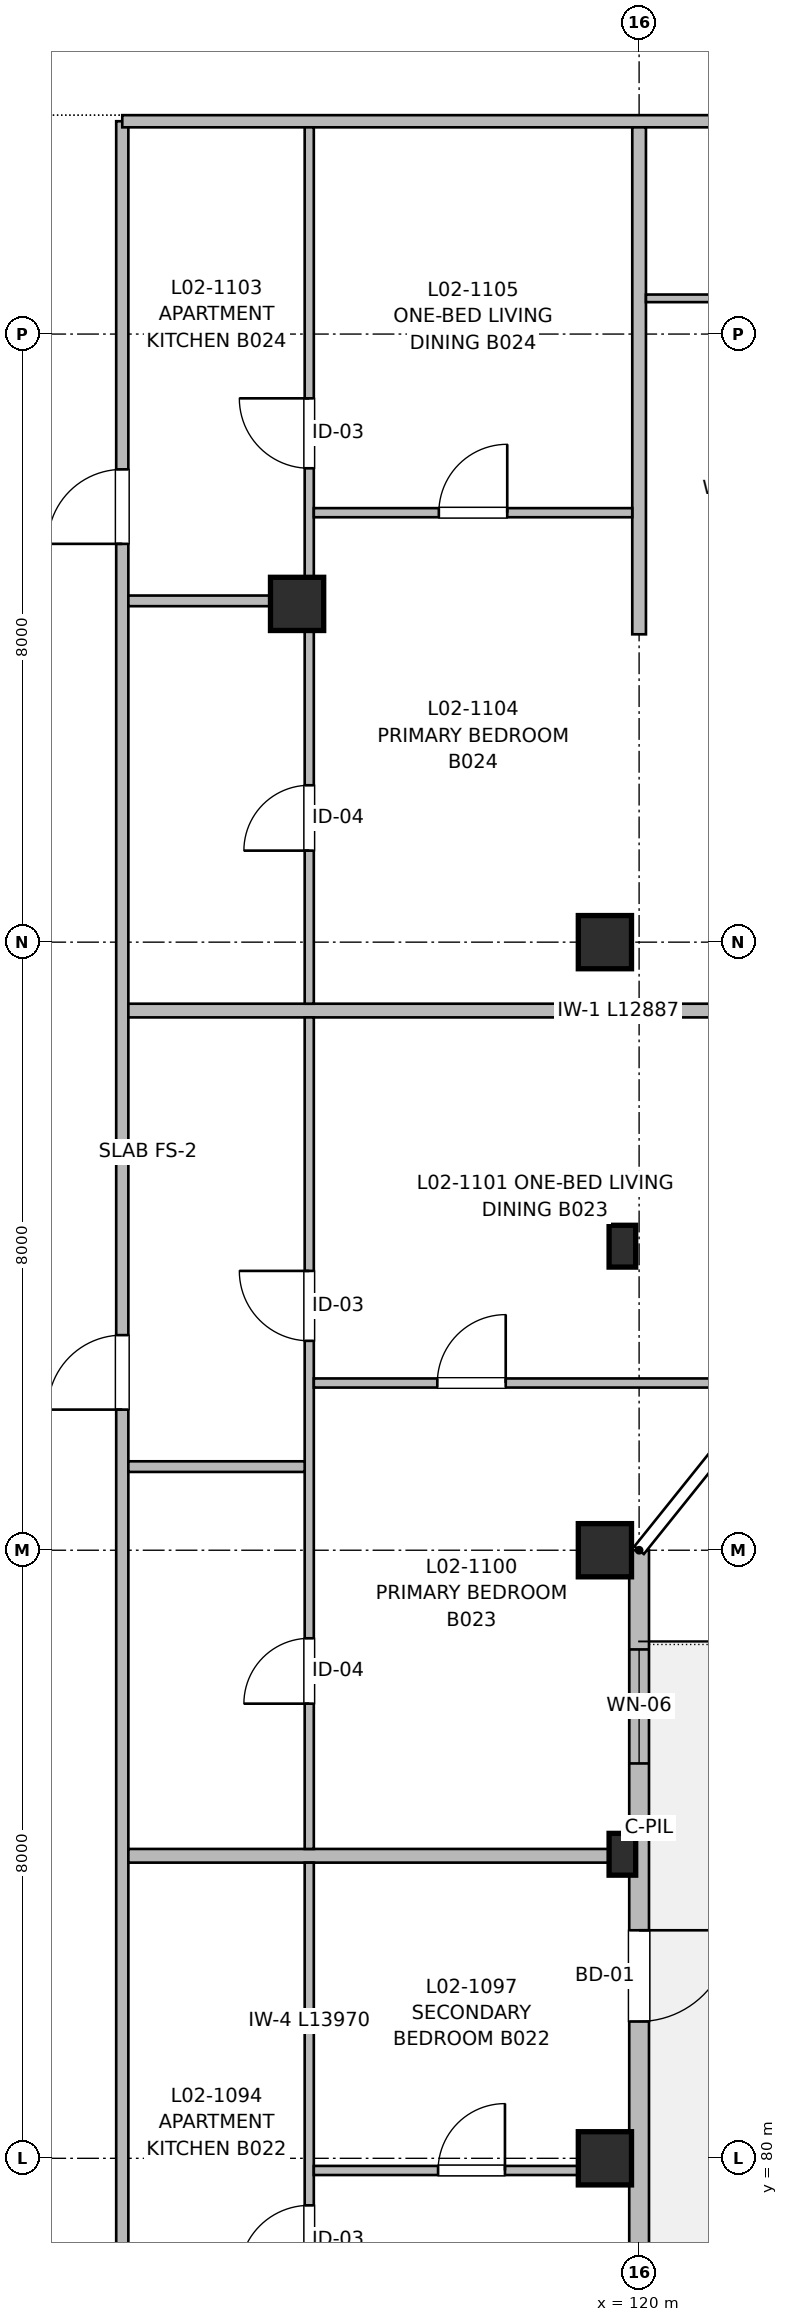
"""IFC4 building model, lengths in metres.
Left out: names, types, materials, properties, quantities, classifications, styles, units other than length and angle.
Written with IfcOpenShell. Run it as: python <this file> out.ifc"""

import sys

from ifc_helpers import new_model, si_unit, direction, frame, frame_2d, origin, origin_2d, place, context, subcontext, project, spatial, rectangle, extrude, element, fill, save


model = new_model("IFC4")
c1 = context("Model", 3, precision=1e-05, world=origin(), true_north=direction((0.0, 1.0)))
c2 = subcontext(c1, "Body", "Model", "MODEL_VIEW")
j1 = project(units=[si_unit("LENGTHUNIT", "METRE"), si_unit("PLANEANGLEUNIT", "RADIAN")], contexts=[c1])
p1 = place(None, origin())
s1 = spatial("IfcSite", under=j1, at=p1, CompositionType="ELEMENT")
p2 = place(p1, origin())
s2 = spatial("IfcBuilding", under=s1, at=p2, CompositionType="ELEMENT")
p3 = place(p2, frame((0.0, 0.0, 7.36)))
s3 = spatial("IfcBuildingStorey", under=s2, at=p3, CompositionType="ELEMENT", Elevation=7.36)
for number, where, z_axis, x_axis in (
    (1, (115.5, 100.45, 0.0), (0.0, 0.0, 1.0), (1.0, 0.0, 0.0)),
    (2, (119.55, 80.0, 0.0), (0.0, 0.0, 1.0), (1.0, 0.0, 0.0)),
    (3, (119.55, 88.0, 0.0), (0.0, 0.0, 1.0), (1.0, 0.0, 0.0)),
    (4, (119.55, 96.0, 0.0), (0.0, 0.0, 1.0), (1.0, 0.0, 0.0)),
):
    element("IfcColumn", number, at=place(p3, frame(where, z_axis=z_axis, x_axis=x_axis)), inside=s3, PredefinedType="COLUMN", context=c2, shape_type="SweptSolid", body=[
        extrude(rectangle(XDim=0.7, YDim=0.7, at=origin_2d()), origin(), (0.0, 0.0, 1.0), 3.2),
    ])
for number, where, z_axis, x_axis in (
    (5, (119.78, 84.0, 0.0), (0.0, 0.0, 1.0), (1.0, 0.0, 0.0)),
    (6, (119.78, 92.0, 0.0), (0.0, 0.0, 1.0), (1.0, 0.0, 0.0)),
):
    element("IfcColumn", number, at=place(p3, frame(where, z_axis=z_axis, x_axis=x_axis)), inside=s3, PredefinedType="PILASTER", context=c2, shape_type="SweptSolid", body=[
        extrude(rectangle(XDim=0.35, YDim=0.55, at=origin_2d()), origin(), (0.0, 0.0, 1.0), 3.2),
    ])
p4 = place(p3, frame((120.0, 88.0, 0.0), z_axis=(0.0, 0.0, 1.0), x_axis=(0.0, -1.0, 0.0)))
e7 = element("IfcWall", 7, at=p4, inside=s3, PredefinedType="SOLIDWALL", context=c2, shape_type="SweptSolid", body=[
    extrude(rectangle(XDim=32.0, YDim=0.26, at=frame_2d((16.0, 0.0))), origin(), (0.0, 0.0, 1.0), 2.98),
])
p5 = place(p4, frame((5.0, 0.0, 0.0)))
e8 = element("IfcOpeningElement", 8, at=p5, cuts=e7, PredefinedType="OPENING", context=c2, shape_type="SweptSolid", body=[
    extrude(rectangle(XDim=1.2, YDim=2.2, at=frame_2d((0.6, 1.1))), frame((0.0, 0.14, 0.0), z_axis=(0.0, -1.0, 0.0), x_axis=(1.0, 0.0, 0.0)), (0.0, 0.0, 1.0), 0.28),
])
p6 = place(p4, frame((11.45, 0.0, 0.62)))
e9 = element("IfcOpeningElement", 9, at=p6, cuts=e7, PredefinedType="OPENING", context=c2, shape_type="SweptSolid", body=[
    extrude(rectangle(XDim=1.1, YDim=1.6, at=frame_2d((0.55, 0.8))), frame((0.0, 0.14, 0.0), z_axis=(0.0, -1.0, 0.0), x_axis=(1.0, 0.0, 0.0)), (0.0, 0.0, 1.0), 0.28),
])
p7 = place(p4, frame((18.65, 0.0, 0.47)))
e10 = element("IfcOpeningElement", 10, at=p7, cuts=e7, PredefinedType="OPENING", context=c2, shape_type="SweptSolid", body=[
    extrude(rectangle(XDim=2.7, YDim=1.75, at=frame_2d((1.35, 0.875))), frame((0.0, 0.14, 0.0), z_axis=(0.0, -1.0, 0.0), x_axis=(1.0, 0.0, 0.0)), (0.0, 0.0, 1.0), 0.28),
])
p8 = place(p4, frame((28.45, 0.0, 0.72)))
e11 = element("IfcOpeningElement", 11, at=p8, cuts=e7, PredefinedType="OPENING", context=c2, shape_type="SweptSolid", body=[
    extrude(rectangle(XDim=1.7, YDim=1.5, at=frame_2d((0.85, 0.75))), frame((0.0, 0.14, 0.0), z_axis=(0.0, -1.0, 0.0), x_axis=(1.0, 0.0, 0.0)), (0.0, 0.0, 1.0), 0.28),
])
p9 = place(p4, frame((24.519, 0.0, 0.82)))
e12 = element("IfcOpeningElement", 12, at=p9, cuts=e7, PredefinedType="OPENING", context=c2, shape_type="SweptSolid", body=[
    extrude(rectangle(XDim=1.5, YDim=1.4, at=frame_2d((0.75, 0.7))), frame((0.0, 0.14, 0.0), z_axis=(0.0, -1.0, 0.0), x_axis=(1.0, 0.0, 0.0)), (0.0, 0.0, 1.0), 0.28),
])
p10 = place(p4, frame((14.021, 0.0, 0.82)))
e13 = element("IfcOpeningElement", 13, at=p10, cuts=e7, PredefinedType="OPENING", context=c2, shape_type="SweptSolid", body=[
    extrude(rectangle(XDim=1.5, YDim=1.4, at=frame_2d((0.75, 0.7))), frame((0.0, 0.14, 0.0), z_axis=(0.0, -1.0, 0.0), x_axis=(1.0, 0.0, 0.0)), (0.0, 0.0, 1.0), 0.28),
])
p11 = place(p4, frame((1.305, 0.0, 0.82)))
e14 = element("IfcOpeningElement", 14, at=p11, cuts=e7, PredefinedType="OPENING", context=c2, shape_type="SweptSolid", body=[
    extrude(rectangle(XDim=1.5, YDim=1.4, at=frame_2d((0.75, 0.7))), frame((0.0, 0.14, 0.0), z_axis=(0.0, -1.0, 0.0), x_axis=(1.0, 0.0, 0.0)), (0.0, 0.0, 1.0), 0.28),
])
p12 = place(p3, frame((113.2, 56.18, 0.0), z_axis=(0.0, 0.0, 1.0), x_axis=(0.0, 1.0, 0.0)))
e15 = element("IfcWall", 15, at=p12, inside=s3, PredefinedType="PARTITIONING", context=c2, shape_type="SweptSolid", body=[
    extrude(rectangle(XDim=50.62, YDim=0.16, at=frame_2d((25.31, 0.0))), origin(), (0.0, 0.0, 1.0), 2.935),
])
p13 = place(p12, frame((6.99, 0.0, 0.0)))
e16 = element("IfcOpeningElement", 16, at=p13, cuts=e15, PredefinedType="OPENING", context=c2, shape_type="SweptSolid", body=[
    extrude(rectangle(XDim=0.98, YDim=2.15, at=frame_2d((0.49, 1.075))), frame((0.0, 0.09, 0.0), z_axis=(0.0, -1.0, 0.0), x_axis=(1.0, 0.0, 0.0)), (0.0, 0.0, 1.0), 0.18),
])
p14 = place(p12, frame((20.92, 0.0, 0.0)))
e17 = element("IfcOpeningElement", 17, at=p14, cuts=e15, PredefinedType="OPENING", context=c2, shape_type="SweptSolid", body=[
    extrude(rectangle(XDim=0.98, YDim=2.15, at=frame_2d((0.49, 1.075))), frame((0.0, 0.09, 0.0), z_axis=(0.0, -1.0, 0.0), x_axis=(1.0, 0.0, 0.0)), (0.0, 0.0, 1.0), 0.18),
])
p15 = place(p12, frame((33.67, 0.0, 0.0)))
e18 = element("IfcOpeningElement", 18, at=p15, cuts=e15, PredefinedType="OPENING", context=c2, shape_type="SweptSolid", body=[
    extrude(rectangle(XDim=0.98, YDim=2.15, at=frame_2d((0.49, 1.075))), frame((0.0, 0.09, 0.0), z_axis=(0.0, -1.0, 0.0), x_axis=(1.0, 0.0, 0.0)), (0.0, 0.0, 1.0), 0.18),
])
p16 = place(p12, frame((45.06, 0.0, 0.0)))
e19 = element("IfcOpeningElement", 19, at=p16, cuts=e15, PredefinedType="OPENING", context=c2, shape_type="SweptSolid", body=[
    extrude(rectangle(XDim=0.98, YDim=2.15, at=frame_2d((0.49, 1.075))), frame((0.0, 0.09, 0.0), z_axis=(0.0, -1.0, 0.0), x_axis=(1.0, 0.0, 0.0)), (0.0, 0.0, 1.0), 0.18),
])
p17 = place(p3, frame((113.2, 106.8, 0.0), z_axis=(0.0, 0.0, 1.0), x_axis=(1.0, 0.0, 0.0)))
e20 = element("IfcWall", 20, at=p17, inside=s3, PredefinedType="PARTITIONING", context=c2, shape_type="SweptSolid", body=[
    extrude(rectangle(XDim=24.12, YDim=0.16, at=frame_2d((12.06, 0.0))), origin(), (0.0, 0.0, 1.0), 2.935),
])
p18 = place(p17, frame((19.575, 0.0, 0.0)))
e21 = element("IfcOpeningElement", 21, at=p18, cuts=e20, PredefinedType="OPENING", context=c2, shape_type="SweptSolid", body=[
    extrude(rectangle(XDim=1.05, YDim=2.15, at=frame_2d((0.525, 1.075))), frame((0.0, 0.09, 0.0), z_axis=(0.0, -1.0, 0.0), x_axis=(1.0, 0.0, 0.0)), (0.0, 0.0, 1.0), 0.18),
])
p19 = place(p17, frame((8.995, 0.0, 0.0)))
e22 = element("IfcOpeningElement", 22, at=p19, cuts=e20, PredefinedType="OPENING", context=c2, shape_type="SweptSolid", body=[
    extrude(rectangle(XDim=0.98, YDim=2.15, at=frame_2d((0.49, 1.075))), frame((0.0, 0.09, 0.0), z_axis=(0.0, -1.0, 0.0), x_axis=(1.0, 0.0, 0.0)), (0.0, 0.0, 1.0), 0.18),
])
p20 = place(p3, frame((120.0, 100.05, 0.0), z_axis=(0.0, 0.0, 1.0), x_axis=(0.0, 1.0, 0.0)))
e23 = element("IfcWall", 23, at=p20, inside=s3, PredefinedType="PARTITIONING", context=c2, shape_type="SweptSolid", body=[
    extrude(rectangle(XDim=6.67, YDim=0.18, at=frame_2d((3.335, 0.0))), origin(), (0.0, 0.0, 1.0), 2.935),
])
p21 = place(p3, frame((113.28, 83.98, 0.0), z_axis=(0.0, 0.0, 1.0), x_axis=(1.0, 0.0, 0.0)))
e24 = element("IfcWall", 24, at=p21, inside=s3, PredefinedType="PARTITIONING", context=c2, shape_type="SweptSolid", body=[
    extrude(rectangle(XDim=6.59, YDim=0.18, at=frame_2d((3.295, 0.0))), origin(), (0.0, 0.0, 1.0), 2.935),
])
p22 = place(p3, frame((113.28, 95.1, 0.0), z_axis=(0.0, 0.0, 1.0), x_axis=(1.0, 0.0, 0.0)))
e25 = element("IfcWall", 25, at=p22, inside=s3, PredefinedType="PARTITIONING", context=c2, shape_type="SweptSolid", body=[
    extrude(rectangle(XDim=12.887, YDim=0.18, at=frame_2d((6.444, 0.0))), origin(), (0.0, 0.0, 1.0), 2.935),
])
p23 = place(p3, frame((115.66, 69.92, 0.0), z_axis=(0.0, 0.0, 1.0), x_axis=(0.0, 1.0, 0.0)))
e26 = element("IfcWall", 26, at=p23, inside=s3, PredefinedType="PARTITIONING", context=c2, shape_type="SweptSolid", body=[
    extrude(rectangle(XDim=13.97, YDim=0.12, at=frame_2d((6.985, 0.0))), origin(), (0.0, 0.0, 1.0), 2.935),
])
p24 = place(p23, frame((2.443, 0.0, 0.0)))
e27 = element("IfcOpeningElement", 27, at=p24, cuts=e26, PredefinedType="OPENING", context=c2, shape_type="SweptSolid", body=[
    extrude(rectangle(XDim=0.86, YDim=2.1, at=frame_2d((0.43, 1.05))), frame((0.0, 0.07, 0.0), z_axis=(0.0, -1.0, 0.0), x_axis=(1.0, 0.0, 0.0)), (0.0, 0.0, 1.0), 0.14),
])
p25 = place(p23, frame((8.541, 0.0, 0.0)))
e28 = element("IfcOpeningElement", 28, at=p25, cuts=e26, PredefinedType="OPENING", context=c2, shape_type="SweptSolid", body=[
    extrude(rectangle(XDim=0.92, YDim=2.1, at=frame_2d((0.46, 1.05))), frame((0.0, 0.07, 0.0), z_axis=(0.0, -1.0, 0.0), x_axis=(1.0, 0.0, 0.0)), (0.0, 0.0, 1.0), 0.14),
])
p26 = place(p3, frame((115.72, 79.84, 0.0), z_axis=(0.0, 0.0, 1.0), x_axis=(1.0, 0.0, 0.0)))
e29 = element("IfcWall", 29, at=p26, inside=s3, PredefinedType="PARTITIONING", context=c2, shape_type="SweptSolid", body=[
    extrude(rectangle(XDim=4.15, YDim=0.12, at=frame_2d((2.075, 0.0))), origin(), (0.0, 0.0, 1.0), 2.53),
])
p27 = place(p26, frame((1.635, 0.0, 0.0)))
e30 = element("IfcOpeningElement", 30, at=p27, cuts=e29, PredefinedType="OPENING", context=c2, shape_type="SweptSolid", body=[
    extrude(rectangle(XDim=0.88, YDim=2.1, at=frame_2d((0.44, 1.05))), frame((0.0, 0.07, 0.0), z_axis=(0.0, -1.0, 0.0), x_axis=(1.0, 0.0, 0.0)), (0.0, 0.0, 1.0), 0.14),
])
p28 = place(p3, frame((115.66, 84.07, 0.0), z_axis=(0.0, 0.0, 1.0), x_axis=(0.0, 1.0, 0.0)))
e31 = element("IfcWall", 31, at=p28, inside=s3, PredefinedType="PARTITIONING", context=c2, shape_type="SweptSolid", body=[
    extrude(rectangle(XDim=10.94, YDim=0.12, at=frame_2d((5.47, 0.0))), origin(), (0.0, 0.0, 1.0), 2.935),
])
p29 = place(p28, frame((1.911, 0.0, 0.0)))
e32 = element("IfcOpeningElement", 32, at=p29, cuts=e31, PredefinedType="OPENING", context=c2, shape_type="SweptSolid", body=[
    extrude(rectangle(XDim=0.86, YDim=2.1, at=frame_2d((0.43, 1.05))), frame((0.0, 0.07, 0.0), z_axis=(0.0, -1.0, 0.0), x_axis=(1.0, 0.0, 0.0)), (0.0, 0.0, 1.0), 0.14),
])
p30 = place(p28, frame((6.685, 0.0, 0.0)))
e33 = element("IfcOpeningElement", 33, at=p30, cuts=e31, PredefinedType="OPENING", context=c2, shape_type="SweptSolid", body=[
    extrude(rectangle(XDim=0.92, YDim=2.1, at=frame_2d((0.46, 1.05))), frame((0.0, 0.07, 0.0), z_axis=(0.0, -1.0, 0.0), x_axis=(1.0, 0.0, 0.0)), (0.0, 0.0, 1.0), 0.14),
])
p31 = place(p3, frame((113.28, 89.1, 0.0), z_axis=(0.0, 0.0, 1.0), x_axis=(1.0, 0.0, 0.0)))
e34 = element("IfcWall", 34, at=p31, inside=s3, PredefinedType="PARTITIONING", context=c2, shape_type="SweptSolid", body=[
    extrude(rectangle(XDim=2.32, YDim=0.14, at=frame_2d((1.16, 0.0))), origin(), (0.0, 0.0, 1.0), 2.935),
])
p32 = place(p3, frame((115.72, 90.2, 0.0), z_axis=(0.0, 0.0, 1.0), x_axis=(1.0, 0.0, 0.0)))
e35 = element("IfcWall", 35, at=p32, inside=s3, PredefinedType="PARTITIONING", context=c2, shape_type="SweptSolid", body=[
    extrude(rectangle(XDim=5.994, YDim=0.12, at=frame_2d((2.997, 0.0))), origin(), (0.0, 0.0, 1.0), 2.935),
])
p33 = place(p32, frame((1.625, 0.0, 0.0)))
e36 = element("IfcOpeningElement", 36, at=p33, cuts=e35, PredefinedType="OPENING", context=c2, shape_type="SweptSolid", body=[
    extrude(rectangle(XDim=0.9, YDim=2.1, at=frame_2d((0.45, 1.05))), frame((0.0, 0.07, 0.0), z_axis=(0.0, -1.0, 0.0), x_axis=(1.0, 0.0, 0.0)), (0.0, 0.0, 1.0), 0.14),
])
p34 = place(p3, frame((115.66, 95.19, 0.0), z_axis=(0.0, 0.0, 1.0), x_axis=(0.0, 1.0, 0.0)))
e37 = element("IfcWall", 37, at=p34, inside=s3, PredefinedType="PARTITIONING", context=c2, shape_type="SweptSolid", body=[
    extrude(rectangle(XDim=11.53, YDim=0.12, at=frame_2d((5.765, 0.0))), origin(), (0.0, 0.0, 1.0), 2.68),
])
p35 = place(p34, frame((2.014, 0.0, 0.0)))
e38 = element("IfcOpeningElement", 38, at=p35, cuts=e37, PredefinedType="OPENING", context=c2, shape_type="SweptSolid", body=[
    extrude(rectangle(XDim=0.86, YDim=2.1, at=frame_2d((0.43, 1.05))), frame((0.0, 0.07, 0.0), z_axis=(0.0, -1.0, 0.0), x_axis=(1.0, 0.0, 0.0)), (0.0, 0.0, 1.0), 0.14),
])
p36 = place(p34, frame((7.044, 0.0, 0.0)))
e39 = element("IfcOpeningElement", 39, at=p36, cuts=e37, PredefinedType="OPENING", context=c2, shape_type="SweptSolid", body=[
    extrude(rectangle(XDim=0.92, YDim=2.1, at=frame_2d((0.46, 1.05))), frame((0.0, 0.07, 0.0), z_axis=(0.0, -1.0, 0.0), x_axis=(1.0, 0.0, 0.0)), (0.0, 0.0, 1.0), 0.14),
])
p37 = place(p3, frame((113.28, 100.49, 0.0), z_axis=(0.0, 0.0, 1.0), x_axis=(1.0, 0.0, 0.0)))
e40 = element("IfcWall", 40, at=p37, inside=s3, PredefinedType="PARTITIONING", context=c2, shape_type="SweptSolid", body=[
    extrude(rectangle(XDim=2.32, YDim=0.14, at=frame_2d((1.16, 0.0))), origin(), (0.0, 0.0, 1.0), 2.73),
])
p38 = place(p3, frame((115.72, 101.65, 0.0), z_axis=(0.0, 0.0, 1.0), x_axis=(1.0, 0.0, 0.0)))
e41 = element("IfcWall", 41, at=p38, inside=s3, PredefinedType="PARTITIONING", context=c2, shape_type="SweptSolid", body=[
    extrude(rectangle(XDim=4.19, YDim=0.12, at=frame_2d((2.095, 0.0))), origin(), (0.0, 0.0, 1.0), 2.935),
])
p39 = place(p38, frame((1.645, 0.0, 0.0)))
e42 = element("IfcOpeningElement", 42, at=p39, cuts=e41, PredefinedType="OPENING", context=c2, shape_type="SweptSolid", body=[
    extrude(rectangle(XDim=0.9, YDim=2.1, at=frame_2d((0.45, 1.05))), frame((0.0, 0.07, 0.0), z_axis=(0.0, -1.0, 0.0), x_axis=(1.0, 0.0, 0.0)), (0.0, 0.0, 1.0), 0.14),
])
p40 = place(p3, frame((120.09, 104.47, 0.0), z_axis=(0.0, 0.0, 1.0), x_axis=(1.0, 0.0, 0.0)))
e43 = element("IfcWall", 43, at=p40, inside=s3, PredefinedType="PARTITIONING", context=c2, shape_type="SweptSolid", body=[
    extrude(rectangle(XDim=5.13, YDim=0.1, at=frame_2d((2.565, 0.0))), origin(), (0.0, 0.0, 1.0), 2.935),
])
p41 = place(p40, frame((2.18, 0.0, 0.0)))
e44 = element("IfcOpeningElement", 44, at=p41, cuts=e43, PredefinedType="OPENING", context=c2, shape_type="SweptSolid", body=[
    extrude(rectangle(XDim=0.92, YDim=2.1, at=frame_2d((0.46, 1.05))), frame((0.0, 0.06, 0.0), z_axis=(0.0, -1.0, 0.0), x_axis=(1.0, 0.0, 0.0)), (0.0, 0.0, 1.0), 0.12),
])
p42 = place(p5, origin())
e45 = element("IfcDoor", 45, at=p42, inside=s3, OperationType="SINGLE_SWING_LEFT", PredefinedType="DOOR", context=c2, shape_type="SweptSolid", body=[
    extrude(rectangle(XDim=1.2, YDim=2.2, at=frame_2d((0.6, 1.1))), frame((0.0, 0.025, 0.0), z_axis=(0.0, -1.0, 0.0), x_axis=(1.0, 0.0, 0.0)), (0.0, 0.0, 1.0), 0.05),
])
fill(e8, e45)
p43 = place(p25, origin())
e46 = element("IfcDoor", 46, at=p43, inside=s3, OperationType="SINGLE_SWING_LEFT", PredefinedType="DOOR", context=c2, shape_type="SweptSolid", body=[
    extrude(rectangle(XDim=0.92, YDim=2.1, at=frame_2d((0.46, 1.05))), frame((0.0, 0.025, 0.0), z_axis=(0.0, -1.0, 0.0), x_axis=(1.0, 0.0, 0.0)), (0.0, 0.0, 1.0), 0.05),
])
fill(e28, e46)
p44 = place(p27, origin())
e47 = element("IfcDoor", 47, at=p44, inside=s3, OperationType="SINGLE_SWING_RIGHT", PredefinedType="DOOR", context=c2, shape_type="SweptSolid", body=[
    extrude(rectangle(XDim=0.88, YDim=2.1, at=frame_2d((0.44, 1.05))), frame((0.0, 0.025, 0.0), z_axis=(0.0, -1.0, 0.0), x_axis=(1.0, 0.0, 0.0)), (0.0, 0.0, 1.0), 0.05),
])
fill(e30, e47)
p45 = place(p29, origin())
e48 = element("IfcDoor", 48, at=p45, inside=s3, OperationType="SINGLE_SWING_LEFT", PredefinedType="DOOR", context=c2, shape_type="SweptSolid", body=[
    extrude(rectangle(XDim=0.86, YDim=2.1, at=frame_2d((0.43, 1.05))), frame((0.0, 0.025, 0.0), z_axis=(0.0, -1.0, 0.0), x_axis=(1.0, 0.0, 0.0)), (0.0, 0.0, 1.0), 0.05),
])
fill(e32, e48)
p46 = place(p30, origin())
e49 = element("IfcDoor", 49, at=p46, inside=s3, OperationType="SINGLE_SWING_RIGHT", PredefinedType="DOOR", context=c2, shape_type="SweptSolid", body=[
    extrude(rectangle(XDim=0.92, YDim=2.1, at=frame_2d((0.46, 1.05))), frame((0.0, 0.025, 0.0), z_axis=(0.0, -1.0, 0.0), x_axis=(1.0, 0.0, 0.0)), (0.0, 0.0, 1.0), 0.05),
])
fill(e33, e49)
p47 = place(p15, origin())
e50 = element("IfcDoor", 50, at=p47, inside=s3, OperationType="SINGLE_SWING_LEFT", PredefinedType="DOOR", context=c2, shape_type="SweptSolid", body=[
    extrude(rectangle(XDim=0.98, YDim=2.15, at=frame_2d((0.49, 1.075))), frame((0.0, 0.025, 0.0), z_axis=(0.0, -1.0, 0.0), x_axis=(1.0, 0.0, 0.0)), (0.0, 0.0, 1.0), 0.05),
])
fill(e18, e50)
p48 = place(p33, origin())
e51 = element("IfcDoor", 51, at=p48, inside=s3, OperationType="SINGLE_SWING_RIGHT", PredefinedType="DOOR", context=c2, shape_type="SweptSolid", body=[
    extrude(rectangle(XDim=0.9, YDim=2.1, at=frame_2d((0.45, 1.05))), frame((0.0, 0.025, 0.0), z_axis=(0.0, -1.0, 0.0), x_axis=(1.0, 0.0, 0.0)), (0.0, 0.0, 1.0), 0.05),
])
fill(e36, e51)
p49 = place(p35, origin())
e52 = element("IfcDoor", 52, at=p49, inside=s3, OperationType="SINGLE_SWING_LEFT", PredefinedType="DOOR", context=c2, shape_type="SweptSolid", body=[
    extrude(rectangle(XDim=0.86, YDim=2.1, at=frame_2d((0.43, 1.05))), frame((0.0, 0.025, 0.0), z_axis=(0.0, -1.0, 0.0), x_axis=(1.0, 0.0, 0.0)), (0.0, 0.0, 1.0), 0.05),
])
fill(e38, e52)
p50 = place(p36, origin())
e53 = element("IfcDoor", 53, at=p50, inside=s3, OperationType="SINGLE_SWING_RIGHT", PredefinedType="DOOR", context=c2, shape_type="SweptSolid", body=[
    extrude(rectangle(XDim=0.92, YDim=2.1, at=frame_2d((0.46, 1.05))), frame((0.0, 0.025, 0.0), z_axis=(0.0, -1.0, 0.0), x_axis=(1.0, 0.0, 0.0)), (0.0, 0.0, 1.0), 0.05),
])
fill(e39, e53)
p51 = place(p16, origin())
e54 = element("IfcDoor", 54, at=p51, inside=s3, OperationType="SINGLE_SWING_LEFT", PredefinedType="DOOR", context=c2, shape_type="SweptSolid", body=[
    extrude(rectangle(XDim=0.98, YDim=2.15, at=frame_2d((0.49, 1.075))), frame((0.0, 0.025, 0.0), z_axis=(0.0, -1.0, 0.0), x_axis=(1.0, 0.0, 0.0)), (0.0, 0.0, 1.0), 0.05),
])
fill(e19, e54)
p52 = place(p39, origin())
e55 = element("IfcDoor", 55, at=p52, inside=s3, OperationType="SINGLE_SWING_RIGHT", PredefinedType="DOOR", context=c2, shape_type="SweptSolid", body=[
    extrude(rectangle(XDim=0.9, YDim=2.1, at=frame_2d((0.45, 1.05))), frame((0.0, 0.025, 0.0), z_axis=(0.0, -1.0, 0.0), x_axis=(1.0, 0.0, 0.0)), (0.0, 0.0, 1.0), 0.05),
])
fill(e42, e55)
p53 = place(p11, origin())
e56 = element("IfcWindow", 56, at=p53, inside=s3, PartitioningType="SINGLE_PANEL", PredefinedType="WINDOW", context=c2, shape_type="SweptSolid", body=[
    extrude(rectangle(XDim=1.5, YDim=1.4, at=frame_2d((0.75, 0.7))), frame((0.0, 0.03, 0.0), z_axis=(0.0, -1.0, 0.0), x_axis=(1.0, 0.0, 0.0)), (0.0, 0.0, 1.0), 0.06),
])
fill(e14, e56)
save(model, sys.argv[1])
